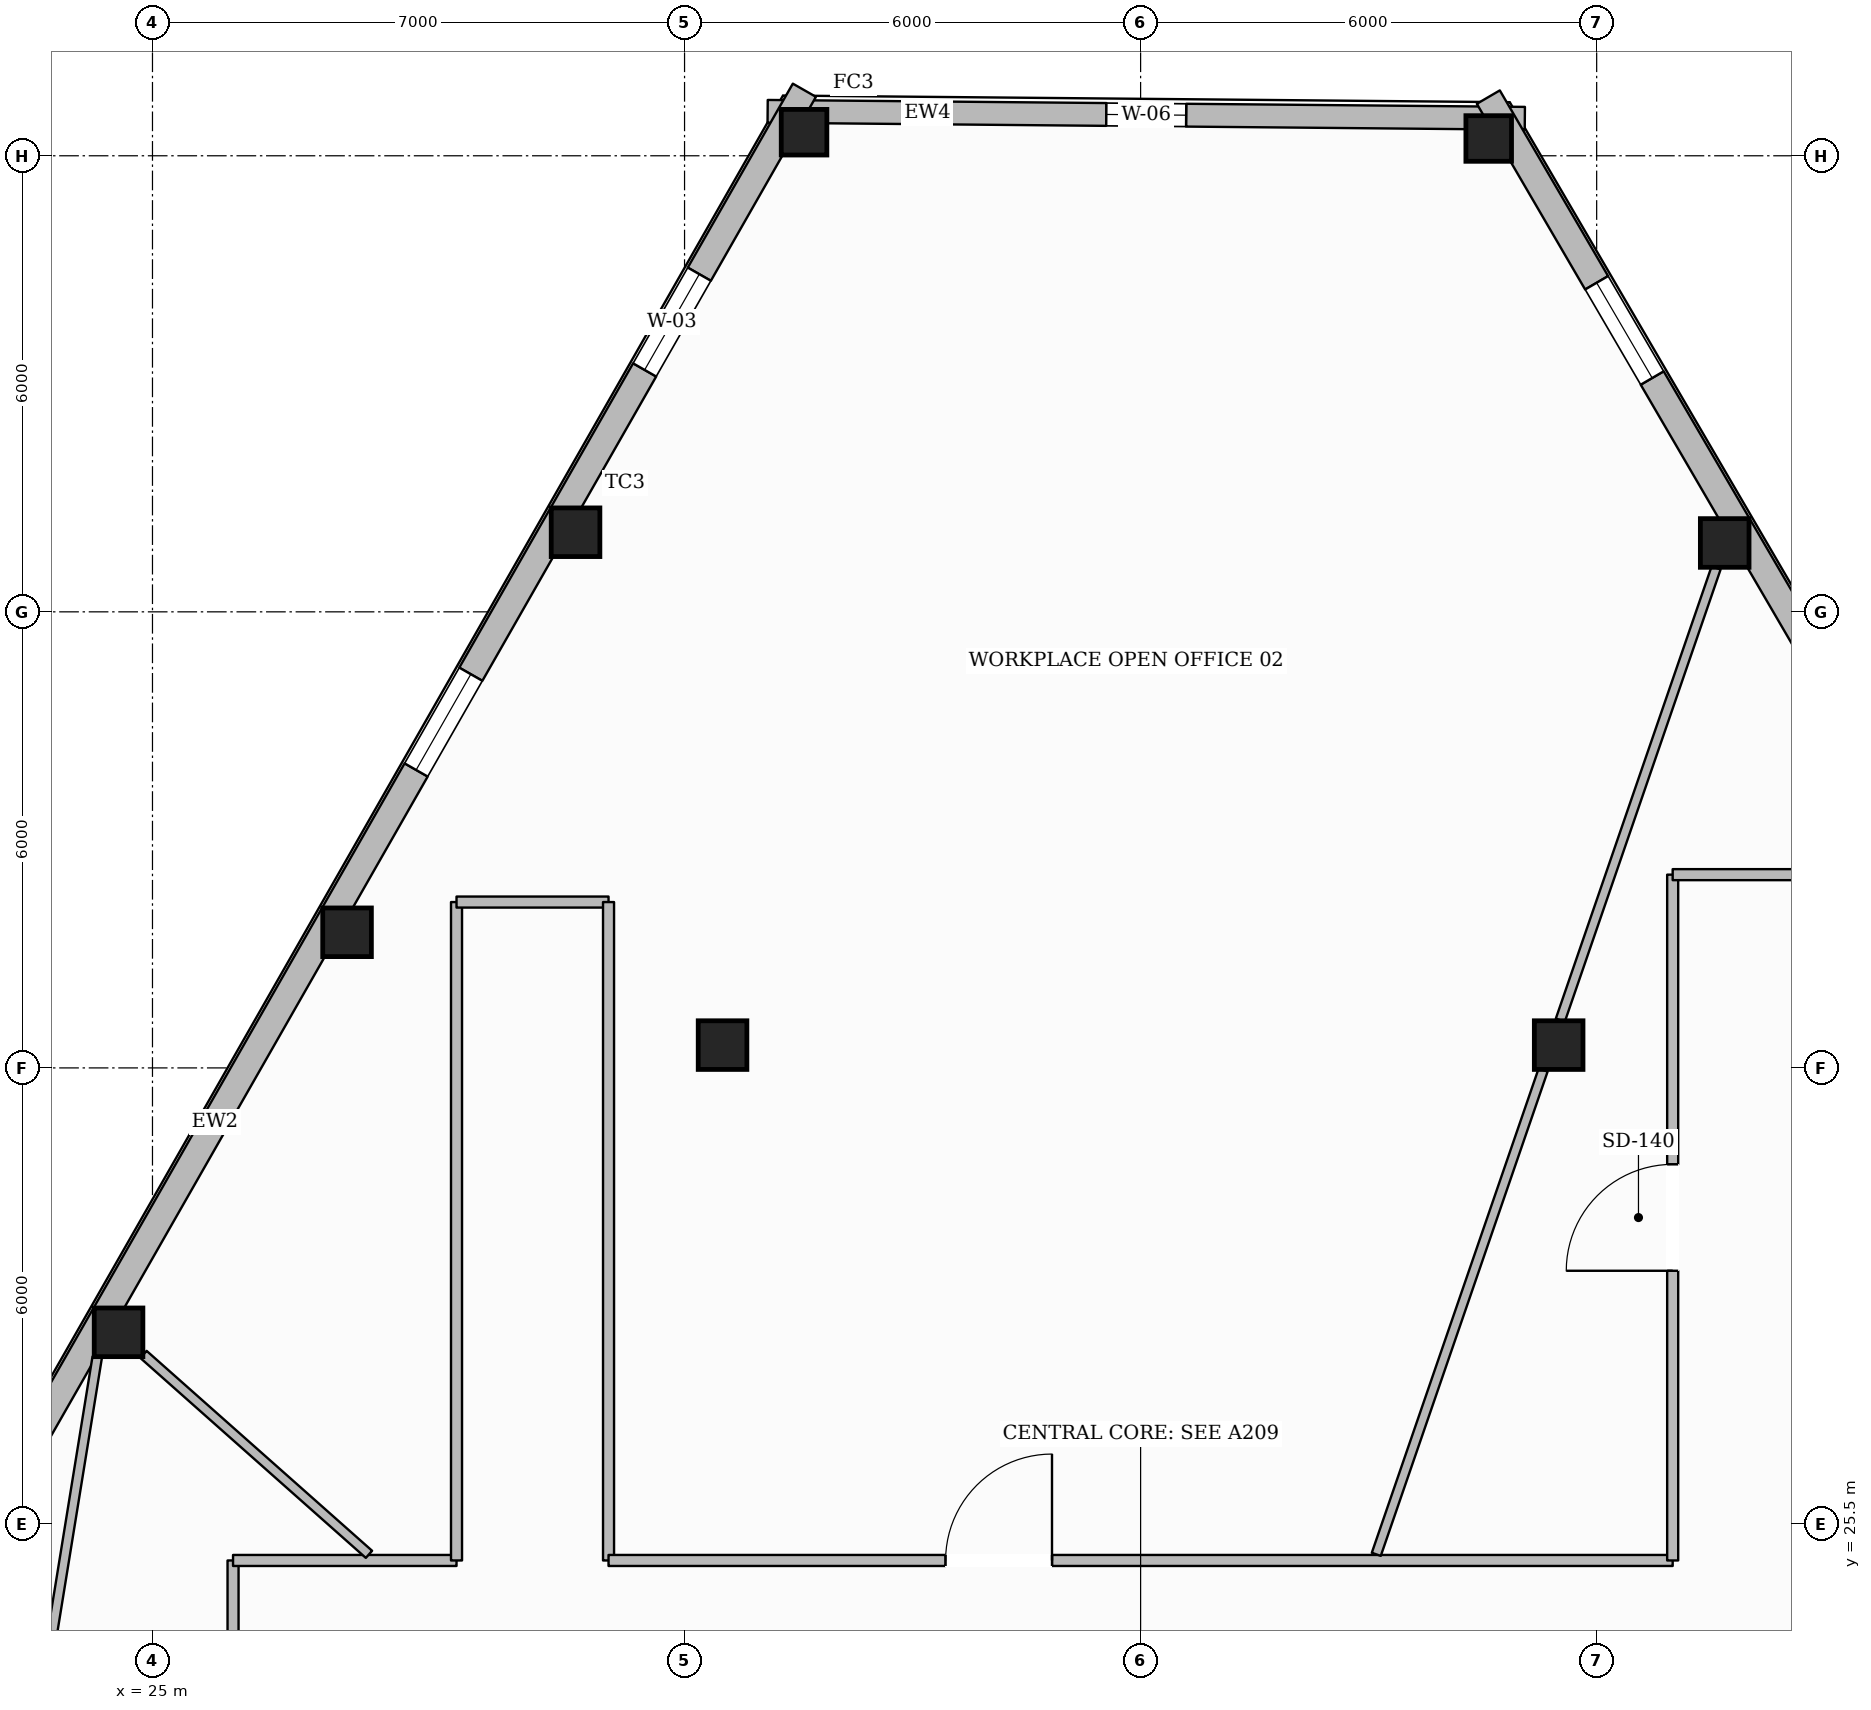
"""IFC4 building model, lengths in metres.
Left out: names, types, materials, properties, quantities, classifications, styles, units other than length and angle.
Written with IfcOpenShell. Run it as: python <this file> out.ifc"""

import sys

from ifc_helpers import new_model, si_unit, direction, frame, frame_2d, origin, origin_2d, place, context, subcontext, project, spatial, rectangle, hollow_rectangle, extrude, element, fill, save


model = new_model("IFC4")
c1 = context("Model", 3, precision=1e-05, world=origin(), true_north=direction((0.0, 1.0)))
c2 = subcontext(c1, "Body", "Model", "MODEL_VIEW")
j1 = project(units=[si_unit("LENGTHUNIT", "METRE"), si_unit("PLANEANGLEUNIT", "RADIAN")], contexts=[c1])
p1 = place(None, origin())
s1 = spatial("IfcSite", under=j1, at=p1, CompositionType="ELEMENT")
p2 = place(p1, origin())
s2 = spatial("IfcBuilding", under=s1, at=p2, CompositionType="ELEMENT")
p3 = place(p2, frame((0.0, 0.0, 180.4)))
s3 = spatial("IfcBuildingStorey", under=s2, at=p3, CompositionType="ELEMENT", Elevation=180.4)
p4 = place(p3, frame((33.572, 43.81, 0.0), z_axis=(0.0, 0.0, 1.0), x_axis=(1.0, 0.0, 0.0)))
e1 = element("IfcColumn", 1, at=p4, inside=s3, PredefinedType="COLUMN", context=c2, shape_type="SweptSolid", body=[
    extrude(hollow_rectangle(XDim=0.6, YDim=0.6, WallThickness=0.028, at=origin_2d()), origin(), (0.0, 0.0, 1.0), 3.6),
])
for number, where, z_axis, x_axis in (
    (2, (30.566, 38.547, 0.0), (0.0, 0.0, 1.0), (1.0, 0.0, 0.0)),
    (3, (27.56, 33.284, 0.0), (0.0, 0.0, 1.0), (1.0, 0.0, 0.0)),
    (4, (24.554, 28.021, 0.0), (0.0, 0.0, 1.0), (1.0, 0.0, 0.0)),
    (5, (45.684, 38.406, 0.0), (0.0, 0.0, 1.0), (1.0, 0.0, 0.0)),
):
    element("IfcColumn", number, at=place(p3, frame(where, z_axis=z_axis, x_axis=x_axis)), inside=s3, PredefinedType="COLUMN", context=c2, shape_type="SweptSolid", body=[
        extrude(hollow_rectangle(XDim=0.64, YDim=0.64, WallThickness=0.028, at=origin_2d()), origin(), (0.0, 0.0, 1.0), 3.6),
    ])
p5 = place(p3, frame((42.58, 43.727, 0.0), z_axis=(0.0, 0.0, 1.0), x_axis=(1.0, 0.0, 0.0)))
e6 = element("IfcColumn", 6, at=p5, inside=s3, PredefinedType="COLUMN", context=c2, shape_type="SweptSolid", body=[
    extrude(hollow_rectangle(XDim=0.6, YDim=0.6, WallThickness=0.028, at=origin_2d()), origin(), (0.0, 0.0, 1.0), 3.6),
])
for number, where, z_axis, x_axis in (
    (7, (32.5, 31.8, 0.0), (0.0, 0.0, 1.0), (1.0, 0.0, 0.0)),
    (8, (43.5, 31.8, 0.0), (0.0, 0.0, 1.0), (1.0, 0.0, 0.0)),
):
    element("IfcColumn", number, at=place(p3, frame(where, z_axis=z_axis, x_axis=x_axis)), inside=s3, PredefinedType="COLUMN", context=c2, shape_type="SweptSolid", body=[
        extrude(hollow_rectangle(XDim=0.64, YDim=0.64, WallThickness=0.028, at=origin_2d()), origin(), (0.0, 0.0, 1.0), 3.6),
    ])
p6 = place(p3, frame((33.093, 44.084, 0.0), z_axis=(0.0, 0.0, 1.0), x_axis=(0.999957994936, -0.009165607679, 0.0)))
e9 = element("IfcWall", 9, at=p6, inside=s3, PredefinedType="STANDARD", context=c2, shape_type="SweptSolid", body=[
    extrude(rectangle(XDim=9.962, YDim=0.3, at=frame_2d((4.981, 0.0))), origin(), (0.0, 0.0, 1.0), 3.132),
])
p7 = place(p6, frame((4.456, 0.0, 0.65)))
e10 = element("IfcOpeningElement", 10, at=p7, cuts=e9, PredefinedType="OPENING", context=c2, shape_type="SweptSolid", body=[
    extrude(rectangle(XDim=1.05, YDim=1.7, at=frame_2d((0.525, 0.85))), frame((0.0, 0.16, 0.0), z_axis=(0.0, -1.0, 0.0), x_axis=(1.0, 0.0, 0.0)), (0.0, 0.0, 1.0), 0.32),
])
p8 = place(p3, frame((15.064, 11.953, 0.0), z_axis=(0.0, 0.0, 1.0), x_axis=(0.495993114815, 0.86832645362, 0.0)))
e11 = element("IfcWall", 11, at=p8, inside=s3, PredefinedType="STANDARD", context=c2, shape_type="SweptSolid", body=[
    extrude(rectangle(XDim=37.324, YDim=0.35, at=frame_2d((18.662, 0.0))), origin(), (0.0, 0.0, 1.0), 3.132),
])
p9 = place(p8, frame((33.087, 0.0, 0.65)))
e12 = element("IfcOpeningElement", 12, at=p9, cuts=e11, PredefinedType="OPENING", context=c2, shape_type="SweptSolid", body=[
    extrude(rectangle(XDim=1.45, YDim=1.75, at=frame_2d((0.725, 0.875))), frame((0.0, 0.185, 0.0), z_axis=(0.0, -1.0, 0.0), x_axis=(1.0, 0.0, 0.0)), (0.0, 0.0, 1.0), 0.37),
])
p10 = place(p8, frame((27.026, 0.0, 0.65)))
e13 = element("IfcOpeningElement", 13, at=p10, cuts=e11, PredefinedType="OPENING", context=c2, shape_type="SweptSolid", body=[
    extrude(rectangle(XDim=1.45, YDim=1.75, at=frame_2d((0.725, 0.875))), frame((0.0, 0.185, 0.0), z_axis=(0.0, -1.0, 0.0), x_axis=(1.0, 0.0, 0.0)), (0.0, 0.0, 1.0), 0.37),
])
p11 = place(p8, frame((14.904, 0.0, 0.65)))
e14 = element("IfcOpeningElement", 14, at=p11, cuts=e11, PredefinedType="OPENING", context=c2, shape_type="SweptSolid", body=[
    extrude(rectangle(XDim=1.45, YDim=1.75, at=frame_2d((0.725, 0.875))), frame((0.0, 0.185, 0.0), z_axis=(0.0, -1.0, 0.0), x_axis=(1.0, 0.0, 0.0)), (0.0, 0.0, 1.0), 0.37),
])
p12 = place(p8, frame((8.844, 0.0, 0.65)))
e15 = element("IfcOpeningElement", 15, at=p12, cuts=e11, PredefinedType="OPENING", context=c2, shape_type="SweptSolid", body=[
    extrude(rectangle(XDim=1.45, YDim=1.75, at=frame_2d((0.725, 0.875))), frame((0.0, 0.185, 0.0), z_axis=(0.0, -1.0, 0.0), x_axis=(1.0, 0.0, 0.0)), (0.0, 0.0, 1.0), 0.37),
])
p13 = place(p8, frame((2.782, 0.0, 0.65)))
e16 = element("IfcOpeningElement", 16, at=p13, cuts=e11, PredefinedType="OPENING", context=c2, shape_type="SweptSolid", body=[
    extrude(rectangle(XDim=1.45, YDim=1.75, at=frame_2d((0.725, 0.875))), frame((0.0, 0.185, 0.0), z_axis=(0.0, -1.0, 0.0), x_axis=(1.0, 0.0, 0.0)), (0.0, 0.0, 1.0), 0.37),
])
p14 = place(p3, frame((42.575, 44.272, 0.0), z_axis=(0.0, 0.0, 1.0), x_axis=(0.503934681705, -0.863741764982, 0.0)))
e17 = element("IfcWall", 17, at=p14, inside=s3, PredefinedType="STANDARD", context=c2, shape_type="SweptSolid", body=[
    extrude(rectangle(XDim=37.915, YDim=0.35, at=frame_2d((18.958, 0.0))), origin(), (0.0, 0.0, 1.0), 3.132),
])
p15 = place(p14, frame((33.633, 0.0, 0.65)))
e18 = element("IfcOpeningElement", 18, at=p15, cuts=e17, PredefinedType="OPENING", context=c2, shape_type="SweptSolid", body=[
    extrude(rectangle(XDim=1.45, YDim=1.75, at=frame_2d((0.725, 0.875))), frame((0.0, 0.185, 0.0), z_axis=(0.0, -1.0, 0.0), x_axis=(1.0, 0.0, 0.0)), (0.0, 0.0, 1.0), 0.37),
])
p16 = place(p14, frame((27.472, 0.0, 0.65)))
e19 = element("IfcOpeningElement", 19, at=p16, cuts=e17, PredefinedType="OPENING", context=c2, shape_type="SweptSolid", body=[
    extrude(rectangle(XDim=1.45, YDim=1.75, at=frame_2d((0.725, 0.875))), frame((0.0, 0.185, 0.0), z_axis=(0.0, -1.0, 0.0), x_axis=(1.0, 0.0, 0.0)), (0.0, 0.0, 1.0), 0.37),
])
p17 = place(p14, frame((15.15, 0.0, 0.65)))
e20 = element("IfcOpeningElement", 20, at=p17, cuts=e17, PredefinedType="OPENING", context=c2, shape_type="SweptSolid", body=[
    extrude(rectangle(XDim=1.45, YDim=1.75, at=frame_2d((0.725, 0.875))), frame((0.0, 0.185, 0.0), z_axis=(0.0, -1.0, 0.0), x_axis=(1.0, 0.0, 0.0)), (0.0, 0.0, 1.0), 0.37),
])
p18 = place(p14, frame((8.989, 0.0, 0.65)))
e21 = element("IfcOpeningElement", 21, at=p18, cuts=e17, PredefinedType="OPENING", context=c2, shape_type="SweptSolid", body=[
    extrude(rectangle(XDim=1.45, YDim=1.75, at=frame_2d((0.725, 0.875))), frame((0.0, 0.185, 0.0), z_axis=(0.0, -1.0, 0.0), x_axis=(1.0, 0.0, 0.0)), (0.0, 0.0, 1.0), 0.37),
])
p19 = place(p14, frame((2.828, 0.0, 0.65)))
e22 = element("IfcOpeningElement", 22, at=p19, cuts=e17, PredefinedType="OPENING", context=c2, shape_type="SweptSolid", body=[
    extrude(rectangle(XDim=1.45, YDim=1.75, at=frame_2d((0.725, 0.875))), frame((0.0, 0.185, 0.0), z_axis=(0.0, -1.0, 0.0), x_axis=(1.0, 0.0, 0.0)), (0.0, 0.0, 1.0), 0.37),
])
p20 = place(p3, frame((26.06, 17.65, 0.0), z_axis=(0.0, 0.0, 1.0), x_axis=(0.0, 1.0, 0.0)))
e23 = element("IfcWall", 23, at=p20, inside=s3, PredefinedType="PARTITIONING", context=c2, shape_type="SweptSolid", body=[
    extrude(rectangle(XDim=7.37, YDim=0.145, at=frame_2d((3.685, 0.0))), origin(), (0.0, 0.0, 1.0), 3.339),
])
p21 = place(p20, frame((3.195, 0.0, 0.0)))
e24 = element("IfcOpeningElement", 24, at=p21, cuts=e23, PredefinedType="OPENING", context=c2, shape_type="SweptSolid", body=[
    extrude(rectangle(XDim=0.98, YDim=2.15, at=frame_2d((0.49, 1.075))), frame((0.0, 0.083, 0.0), z_axis=(0.0, -1.0, 0.0), x_axis=(1.0, 0.0, 0.0)), (0.0, 0.0, 1.0), 0.165),
])
p22 = place(p3, frame((26.06, 25.02, 0.0), z_axis=(0.0, 0.0, 1.0), x_axis=(1.0, 0.0, 0.0)))
e25 = element("IfcWall", 25, at=p22, inside=s3, PredefinedType="PARTITIONING", context=c2, shape_type="SweptSolid", body=[
    extrude(rectangle(XDim=2.94, YDim=0.145, at=frame_2d((1.47, 0.0))), origin(), (0.0, 0.0, 1.0), 3.6),
])
p23 = place(p3, frame((29.0, 25.02, 0.0), z_axis=(0.0, 0.0, 1.0), x_axis=(0.0, 1.0, 0.0)))
e26 = element("IfcWall", 26, at=p23, inside=s3, PredefinedType="PARTITIONING", context=c2, shape_type="SweptSolid", body=[
    extrude(rectangle(XDim=8.662, YDim=0.145, at=frame_2d((4.331, 0.0))), origin(), (0.0, 0.0, 1.0), 3.6),
])
p24 = place(p3, frame((29.0, 33.682, 0.0), z_axis=(0.0, 0.0, 1.0), x_axis=(1.0, 0.0, 0.0)))
e27 = element("IfcWall", 27, at=p24, inside=s3, PredefinedType="PARTITIONING", context=c2, shape_type="SweptSolid", body=[
    extrude(rectangle(XDim=2.0, YDim=0.145, at=frame_2d((1.0, 0.0))), origin(), (0.0, 0.0, 1.0), 3.6),
])
p25 = place(p3, frame((31.0, 33.682, 0.0), z_axis=(0.0, 0.0, 1.0), x_axis=(0.0, -1.0, 0.0)))
e28 = element("IfcWall", 28, at=p25, inside=s3, PredefinedType="PARTITIONING", context=c2, shape_type="SweptSolid", body=[
    extrude(rectangle(XDim=8.662, YDim=0.145, at=frame_2d((4.331, 0.0))), origin(), (0.0, 0.0, 1.0), 3.6),
])
p26 = place(p3, frame((31.0, 25.02, 0.0), z_axis=(0.0, 0.0, 1.0), x_axis=(1.0, 0.0, 0.0)))
e29 = element("IfcWall", 29, at=p26, inside=s3, PredefinedType="PARTITIONING", context=c2, shape_type="SweptSolid", body=[
    extrude(rectangle(XDim=14.0, YDim=0.145, at=frame_2d((7.0, 0.0))), origin(), (0.0, 0.0, 1.0), 3.6),
])
p27 = place(p26, frame((4.434, 0.0, 0.0)))
e30 = element("IfcOpeningElement", 30, at=p27, cuts=e29, PredefinedType="OPENING", context=c2, shape_type="SweptSolid", body=[
    extrude(rectangle(XDim=1.4, YDim=2.2, at=frame_2d((0.7, 1.1))), frame((0.0, 0.083, 0.0), z_axis=(0.0, -1.0, 0.0), x_axis=(1.0, 0.0, 0.0)), (0.0, 0.0, 1.0), 0.165),
])
p28 = place(p3, frame((45.0, 25.02, 0.0), z_axis=(0.0, 0.0, 1.0), x_axis=(0.0, 1.0, 0.0)))
e31 = element("IfcWall", 31, at=p28, inside=s3, PredefinedType="PARTITIONING", context=c2, shape_type="SweptSolid", body=[
    extrude(rectangle(XDim=9.022, YDim=0.145, at=frame_2d((4.511, 0.0))), origin(), (0.0, 0.0, 1.0), 3.6),
])
p29 = place(p28, frame((3.811, 0.0, 0.0)))
e32 = element("IfcOpeningElement", 32, at=p29, cuts=e31, PredefinedType="OPENING", context=c2, shape_type="SweptSolid", body=[
    extrude(rectangle(XDim=1.4, YDim=2.2, at=frame_2d((0.7, 1.1))), frame((0.0, 0.083, 0.0), z_axis=(0.0, -1.0, 0.0), x_axis=(1.0, 0.0, 0.0)), (0.0, 0.0, 1.0), 0.165),
])
p30 = place(p3, frame((45.0, 34.042, 0.0), z_axis=(0.0, 0.0, 1.0), x_axis=(1.0, 0.0, 0.0)))
e33 = element("IfcWall", 33, at=p30, inside=s3, PredefinedType="PARTITIONING", context=c2, shape_type="SweptSolid", body=[
    extrude(rectangle(XDim=2.0, YDim=0.145, at=frame_2d((1.0, 0.0))), origin(), (0.0, 0.0, 1.0), 3.6),
])
p31 = place(p3, frame((41.101, 25.101, 0.0), z_axis=(0.0, 0.0, 1.0), x_axis=(0.325732757855, 0.945461882077, 0.0)))
e34 = element("IfcWall", 34, at=p31, inside=s3, PredefinedType="PARTITIONING", context=c2, shape_type="SweptSolid", body=[
    extrude(rectangle(XDim=6.739, YDim=0.125, at=frame_2d((3.369, 0.0))), origin(), (0.0, 0.0, 1.0), 3.141),
])
p32 = place(p3, frame((43.521, 32.128, 0.0), z_axis=(0.0, 0.0, 1.0), x_axis=(0.325720467461, 0.945466116303, 0.0)))
e35 = element("IfcWall", 35, at=p32, inside=s3, PredefinedType="PARTITIONING", context=c2, shape_type="SweptSolid", body=[
    extrude(rectangle(XDim=6.293, YDim=0.125, at=frame_2d((3.146, 0.0))), origin(), (0.0, 0.0, 1.0), 3.6),
])
p33 = place(p3, frame((27.848, 25.101, 0.0), z_axis=(0.0, 0.0, 1.0), x_axis=(-0.748288582972, 0.66337334631, 0.0)))
e36 = element("IfcWall", 36, at=p33, inside=s3, PredefinedType="PARTITIONING", context=c2, shape_type="SweptSolid", body=[
    extrude(rectangle(XDim=3.965, YDim=0.125, at=frame_2d((1.982, 0.0))), origin(), (0.0, 0.0, 1.0), 3.141),
])
p34 = place(p3, frame((24.273, 27.694, 0.0), z_axis=(0.0, 0.0, 1.0), x_axis=(-0.160245052552, -0.987077263, 0.0)))
e37 = element("IfcWall", 37, at=p34, inside=s3, PredefinedType="PARTITIONING", context=c2, shape_type="SweptSolid", body=[
    extrude(rectangle(XDim=14.53, YDim=0.125, at=frame_2d((7.265, 0.0))), origin(), (0.0, 0.0, 1.0), 3.135),
])
p35 = place(p34, frame((6.665, 0.0, 0.0)))
e38 = element("IfcOpeningElement", 38, at=p35, cuts=e37, PredefinedType="OPENING", context=c2, shape_type="SweptSolid", body=[
    extrude(rectangle(XDim=0.98, YDim=2.15, at=frame_2d((0.49, 1.075))), frame((0.0, 0.073, 0.0), z_axis=(0.0, -1.0, 0.0), x_axis=(1.0, 0.0, 0.0)), (0.0, 0.0, 1.0), 0.145),
])
p36 = place(p9, origin())
e39 = element("IfcWindow", 39, at=p36, inside=s3, PartitioningType="SINGLE_PANEL", PredefinedType="WINDOW", context=c2, shape_type="SweptSolid", body=[
    extrude(rectangle(XDim=1.45, YDim=1.75, at=frame_2d((0.725, 0.875))), frame((0.0, 0.03, 0.0), z_axis=(0.0, -1.0, 0.0), x_axis=(1.0, 0.0, 0.0)), (0.0, 0.0, 1.0), 0.06),
])
fill(e12, e39)
p37 = place(p10, origin())
e40 = element("IfcWindow", 40, at=p37, inside=s3, PartitioningType="SINGLE_PANEL", PredefinedType="WINDOW", context=c2, shape_type="SweptSolid", body=[
    extrude(rectangle(XDim=1.45, YDim=1.75, at=frame_2d((0.725, 0.875))), frame((0.0, 0.03, 0.0), z_axis=(0.0, -1.0, 0.0), x_axis=(1.0, 0.0, 0.0)), (0.0, 0.0, 1.0), 0.06),
])
fill(e13, e40)
p38 = place(p19, origin())
e41 = element("IfcWindow", 41, at=p38, inside=s3, PartitioningType="SINGLE_PANEL", PredefinedType="WINDOW", context=c2, shape_type="SweptSolid", body=[
    extrude(rectangle(XDim=1.45, YDim=1.75, at=frame_2d((0.725, 0.875))), frame((0.0, 0.03, 0.0), z_axis=(0.0, -1.0, 0.0), x_axis=(1.0, 0.0, 0.0)), (0.0, 0.0, 1.0), 0.06),
])
fill(e22, e41)
p39 = place(p7, origin())
e42 = element("IfcWindow", 42, at=p39, inside=s3, PartitioningType="SINGLE_PANEL", PredefinedType="WINDOW", context=c2, shape_type="SweptSolid", body=[
    extrude(rectangle(XDim=1.05, YDim=1.7, at=frame_2d((0.525, 0.85))), frame((0.0, 0.03, 0.0), z_axis=(0.0, -1.0, 0.0), x_axis=(1.0, 0.0, 0.0)), (0.0, 0.0, 1.0), 0.06),
])
fill(e10, e42)
p40 = place(p29, origin())
e43 = element("IfcDoor", 43, at=p40, inside=s3, OperationType="SINGLE_SWING_LEFT", PredefinedType="DOOR", context=c2, shape_type="SweptSolid", body=[
    extrude(rectangle(XDim=1.4, YDim=2.2, at=frame_2d((0.7, 1.1))), frame((0.0, 0.025, 0.0), z_axis=(0.0, -1.0, 0.0), x_axis=(1.0, 0.0, 0.0)), (0.0, 0.0, 1.0), 0.05),
])
fill(e32, e43)
p41 = place(p27, origin())
e44 = element("IfcDoor", 44, at=p41, inside=s3, OperationType="SINGLE_SWING_RIGHT", PredefinedType="DOOR", context=c2, shape_type="SweptSolid", body=[
    extrude(rectangle(XDim=1.4, YDim=2.2, at=frame_2d((0.7, 1.1))), frame((0.0, 0.025, 0.0), z_axis=(0.0, -1.0, 0.0), x_axis=(1.0, 0.0, 0.0)), (0.0, 0.0, 1.0), 0.05),
])
fill(e30, e44)
save(model, sys.argv[1])
